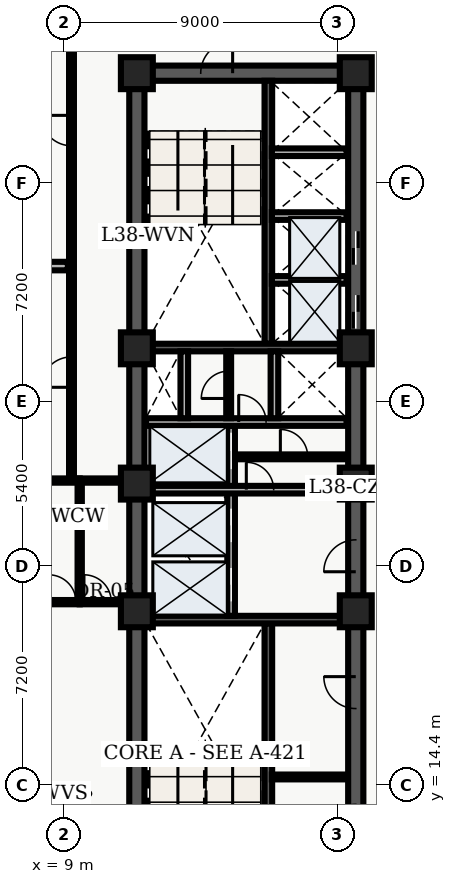
"""IFC4 building model, lengths in metres.
Left out: names, types, materials, properties, quantities, classifications, styles, units other than length and angle.
Written with IfcOpenShell. Run it as: python <this file> out.ifc"""

import sys

from ifc_helpers import new_model, entity, si_unit, converted_unit, direction, frame, origin_with_axes, origin_2d_with_axis, place, context, subcontext, project, spatial, polyline, rectangle, outline, extrude, element, fill, save


model = new_model("IFC4")
c1 = context("Model", 3, precision=1e-05, world=origin_with_axes(), true_north=direction((0.0, 1.0)))
c2 = subcontext(c1, "Body", "Model", "MODEL_VIEW")
j1 = project(units=[si_unit("LENGTHUNIT", "METRE"), converted_unit("PLANEANGLEUNIT", "DEGREE", entity("IfcPlaneAngleMeasure", 0.017), si_unit("PLANEANGLEUNIT", "RADIAN"), dimensions=[0, 0, 0, 0, 0, 0, 0])], contexts=[c1])
p1 = place(None, origin_with_axes())
s1 = spatial("IfcSite", under=j1, at=p1, CompositionType="ELEMENT")
p2 = place(p1, origin_with_axes())
s2 = spatial("IfcBuilding", under=s1, at=p2, CompositionType="ELEMENT")
p3 = place(p2, frame((0.0, 0.0, 156.3), z_axis=(0.0, 0.0, 1.0), x_axis=(1.0, 0.0, 0.0)))
s3 = spatial("IfcBuildingStorey", under=s2, at=p3, CompositionType="ELEMENT", Elevation=156.3)
p4 = place(p3, frame((11.4, 10.8, 0.0), z_axis=(0.0, 0.0, 1.0), x_axis=(0.0, 1.0, 0.0)))
e1 = element("IfcWall", 1, at=p4, inside=s3, PredefinedType="SHEAR", context=c2, shape_type="SweptSolid", body=[
    extrude(outline(polyline([(0.0, -0.25), (27.0, -0.25), (27.0, 0.25), (0.0, 0.25), (0.0, -0.25)])), origin_with_axes(), (0.0, 0.0, 1.0), 3.66),
])
p5 = place(p3, frame((11.4, 37.8, 0.0), z_axis=(0.0, 0.0, 1.0), x_axis=(1.0, 0.0, 0.0)))
e2 = element("IfcWall", 2, at=p5, inside=s3, PredefinedType="SHEAR", context=c2, shape_type="SweptSolid", body=[
    extrude(outline(polyline([(0.0, -0.25), (7.2, -0.25), (7.2, 0.25), (0.0, 0.25), (0.0, -0.25)])), origin_with_axes(), (0.0, 0.0, 1.0), 3.66),
])
p6 = place(p5, frame((2.625, 0.0, 0.0), z_axis=(0.0, 0.0, 1.0), x_axis=(1.0, 0.0, 0.0)))
e3 = element("IfcOpeningElement", 3, at=p6, cuts=e2, PredefinedType="OPENING", context=c2, shape_type="SweptSolid", body=[
    extrude(rectangle(XDim=1.05, YDim=0.52, at=origin_2d_with_axis()), origin_with_axes(), (0.0, 0.0, 1.0), 2.15),
])
p7 = place(p3, frame((18.6, 10.8, 0.0), z_axis=(0.0, 0.0, 1.0), x_axis=(0.0, 1.0, 0.0)))
e4 = element("IfcWall", 4, at=p7, inside=s3, PredefinedType="SHEAR", context=c2, shape_type="SweptSolid", body=[
    extrude(outline(polyline([(0.0, -0.25), (13.5, -0.25), (13.5, 0.25), (0.0, 0.25), (0.0, -0.25)])), origin_with_axes(), (0.0, 0.0, 1.0), 3.66),
])
p8 = place(p7, frame((11.125, 0.0, 0.0), z_axis=(0.0, 0.0, 1.0), x_axis=(1.0, 0.0, 0.0)))
e5 = element("IfcOpeningElement", 5, at=p8, cuts=e4, PredefinedType="OPENING", context=c2, shape_type="SweptSolid", body=[
    extrude(rectangle(XDim=1.05, YDim=0.52, at=origin_2d_with_axis()), origin_with_axes(), (0.0, 0.0, 1.0), 2.15),
])
p9 = place(p7, frame((2.425, 0.0, 0.0), z_axis=(0.0, 0.0, 1.0), x_axis=(1.0, 0.0, 0.0)))
e6 = element("IfcOpeningElement", 6, at=p9, cuts=e4, PredefinedType="OPENING", context=c2, shape_type="SweptSolid", body=[
    extrude(rectangle(XDim=1.05, YDim=0.52, at=origin_2d_with_axis()), origin_with_axes(), (0.0, 0.0, 1.0), 2.15),
])
p10 = place(p7, frame((6.625, 0.0, 0.0), z_axis=(0.0, 0.0, 1.0), x_axis=(1.0, 0.0, 0.0)))
e7 = element("IfcOpeningElement", 7, at=p10, cuts=e4, PredefinedType="OPENING", context=c2, shape_type="SweptSolid", body=[
    extrude(rectangle(XDim=1.05, YDim=0.52, at=origin_2d_with_axis()), origin_with_axes(), (0.0, 0.0, 1.0), 2.15),
])
p11 = place(p3, frame((18.6, 24.3, 0.0), z_axis=(0.0, 0.0, 1.0), x_axis=(0.0, 1.0, 0.0)))
e8 = element("IfcWall", 8, at=p11, inside=s3, PredefinedType="SHEAR", context=c2, shape_type="SweptSolid", body=[
    extrude(outline(polyline([(0.0, -0.25), (13.5, -0.25), (13.5, 0.25), (0.0, 0.25), (0.0, -0.25)])), origin_with_axes(), (0.0, 0.0, 1.0), 3.66),
])
p12 = place(p11, frame((5.65, 0.0, 0.0), z_axis=(0.0, 0.0, 1.0), x_axis=(1.0, 0.0, 0.0)))
e9 = element("IfcOpeningElement", 9, at=p12, cuts=e8, PredefinedType="OPENING", context=c2, shape_type="SweptSolid", body=[
    extrude(rectangle(XDim=1.1, YDim=0.52, at=origin_2d_with_axis()), origin_with_axes(), (0.0, 0.0, 1.0), 2.15),
])
p13 = place(p11, frame((7.75, 0.0, 0.0), z_axis=(0.0, 0.0, 1.0), x_axis=(1.0, 0.0, 0.0)))
e10 = element("IfcOpeningElement", 10, at=p13, cuts=e8, PredefinedType="OPENING", context=c2, shape_type="SweptSolid", body=[
    extrude(rectangle(XDim=1.1, YDim=0.52, at=origin_2d_with_axis()), origin_with_axes(), (0.0, 0.0, 1.0), 2.15),
])
p14 = place(p3, frame((15.725, 11.05, 0.0), z_axis=(0.0, 0.0, 1.0), x_axis=(0.0, 1.0, 0.0)))
e11 = element("IfcWall", 11, at=p14, inside=s3, PredefinedType="SHEAR", context=c2, shape_type="SweptSolid", body=[
    extrude(outline(polyline([(0.0, -0.125), (8.65, -0.125), (8.65, 0.125), (0.0, 0.125), (0.0, -0.125)])), origin_with_axes(), (0.0, 0.0, 1.0), 3.66),
])
p15 = place(p3, frame((11.65, 19.825, 0.0), z_axis=(0.0, 0.0, 1.0), x_axis=(1.0, 0.0, 0.0)))
e12 = element("IfcWall", 12, at=p15, inside=s3, PredefinedType="SHEAR", context=c2, shape_type="SweptSolid", body=[
    extrude(outline(polyline([(0.0, -0.125), (6.7, -0.125), (6.7, 0.125), (0.0, 0.125), (0.0, -0.125)])), origin_with_axes(), (0.0, 0.0, 1.0), 3.66),
])
p16 = place(p3, frame((15.725, 28.9, 0.0), z_axis=(0.0, 0.0, 1.0), x_axis=(0.0, 1.0, 0.0)))
e13 = element("IfcWall", 13, at=p16, inside=s3, PredefinedType="SHEAR", context=c2, shape_type="SweptSolid", body=[
    extrude(outline(polyline([(0.0, -0.125), (8.65, -0.125), (8.65, 0.125), (0.0, 0.125), (0.0, -0.125)])), origin_with_axes(), (0.0, 0.0, 1.0), 3.66),
])
p17 = place(p3, frame((11.65, 28.775, 0.0), z_axis=(0.0, 0.0, 1.0), x_axis=(1.0, 0.0, 0.0)))
e14 = element("IfcWall", 14, at=p17, inside=s3, PredefinedType="SHEAR", context=c2, shape_type="SweptSolid", body=[
    extrude(outline(polyline([(0.0, -0.125), (6.7, -0.125), (6.7, 0.125), (0.0, 0.125), (0.0, -0.125)])), origin_with_axes(), (0.0, 0.0, 1.0), 3.66),
])
p18 = place(p3, frame((14.5, 19.95, 0.0), z_axis=(0.0, 0.0, 1.0), x_axis=(0.0, 1.0, 0.0)))
e15 = element("IfcWall", 15, at=p18, inside=s3, PredefinedType="SOLIDWALL", context=c2, shape_type="SweptSolid", body=[
    extrude(outline(polyline([(0.0, -0.125), (6.25, -0.125), (6.25, 0.125), (0.0, 0.125), (0.0, -0.125)])), origin_with_axes(), (0.0, 0.0, 1.0), 2.7),
])
p19 = place(p18, frame((1.025, 0.0, 0.0), z_axis=(0.0, 0.0, 1.0), x_axis=(1.0, 0.0, 0.0)))
e16 = element("IfcOpeningElement", 16, at=p19, cuts=e15, PredefinedType="OPENING", context=c2, shape_type="SweptSolid", body=[
    extrude(rectangle(XDim=1.1, YDim=0.27, at=origin_2d_with_axis()), origin_with_axes(), (0.0, 0.0, 1.0), 2.15),
])
p20 = place(p18, frame((2.975, 0.0, 0.0), z_axis=(0.0, 0.0, 1.0), x_axis=(1.0, 0.0, 0.0)))
e17 = element("IfcOpeningElement", 17, at=p20, cuts=e15, PredefinedType="OPENING", context=c2, shape_type="SweptSolid", body=[
    extrude(rectangle(XDim=1.1, YDim=0.27, at=origin_2d_with_axis()), origin_with_axes(), (0.0, 0.0, 1.0), 2.15),
])
p21 = place(p18, frame((5.425, 0.0, 0.0), z_axis=(0.0, 0.0, 1.0), x_axis=(1.0, 0.0, 0.0)))
e18 = element("IfcOpeningElement", 18, at=p21, cuts=e15, PredefinedType="OPENING", context=c2, shape_type="SweptSolid", body=[
    extrude(rectangle(XDim=1.2, YDim=0.27, at=origin_2d_with_axis()), origin_with_axes(), (0.0, 0.0, 1.0), 2.15),
])
p22 = place(p3, frame((11.7, 24.1, 0.0), z_axis=(0.0, 0.0, 1.0), x_axis=(1.0, 0.0, 0.0)))
e19 = element("IfcWall", 19, at=p22, inside=s3, PredefinedType="SOLIDWALL", context=c2, shape_type="SweptSolid", body=[
    extrude(outline(polyline([(0.0, -0.125), (6.6, -0.125), (6.6, 0.125), (0.0, 0.125), (0.0, -0.125)])), origin_with_axes(), (0.0, 0.0, 1.0), 2.7),
])
p23 = place(p22, frame((3.75, 0.0, 0.0), z_axis=(0.0, 0.0, 1.0), x_axis=(1.0, 0.0, 0.0)))
e20 = element("IfcOpeningElement", 20, at=p23, cuts=e19, PredefinedType="OPENING", context=c2, shape_type="SweptSolid", body=[
    extrude(rectangle(XDim=0.9, YDim=0.27, at=origin_2d_with_axis()), origin_with_axes(), (0.0, 0.0, 1.0), 2.15),
])
p24 = place(p3, frame((11.7, 26.325, 0.0), z_axis=(0.0, 0.0, 1.0), x_axis=(1.0, 0.0, 0.0)))
e21 = element("IfcWall", 21, at=p24, inside=s3, PredefinedType="SOLIDWALL", context=c2, shape_type="SweptSolid", body=[
    extrude(outline(polyline([(0.0, -0.125), (6.6, -0.125), (6.6, 0.125), (0.0, 0.125), (0.0, -0.125)])), origin_with_axes(), (0.0, 0.0, 1.0), 2.7),
])
p25 = place(p24, frame((3.5, 0.0, 0.0), z_axis=(0.0, 0.0, 1.0), x_axis=(1.0, 0.0, 0.0)))
e22 = element("IfcOpeningElement", 22, at=p25, cuts=e21, PredefinedType="OPENING", context=c2, shape_type="SweptSolid", body=[
    extrude(rectangle(XDim=0.9, YDim=0.27, at=origin_2d_with_axis()), origin_with_axes(), (0.0, 0.0, 1.0), 2.15),
])
for number, where, z_axis, x_axis in (
    (23, (12.96, 26.45, 0.0), (0.0, 0.0, 1.0), (0.0, 1.0, 0.0)),
    (24, (15.925, 26.45, 0.0), (0.0, 0.0, 1.0), (0.0, 1.0, 0.0)),
):
    element("IfcWall", number, at=place(p3, frame(where, z_axis=z_axis, x_axis=x_axis)), inside=s3, PredefinedType="SOLIDWALL", context=c2, shape_type="SweptSolid", body=[
        extrude(outline(polyline([(0.0, -0.125), (2.2, -0.125), (2.2, 0.125), (0.0, 0.125), (0.0, -0.125)])), origin_with_axes(), (0.0, 0.0, 1.0), 2.7),
    ])
for number, where, z_axis, x_axis in (
    (25, (11.4, 20.1, 0.0), (0.0, 0.0, 1.0), (1.0, 0.0, 0.0)),
    (26, (11.4, 24.3, 0.0), (0.0, 0.0, 1.0), (1.0, 0.0, 0.0)),
    (27, (11.4, 28.75, 0.0), (0.0, 0.0, 1.0), (1.0, 0.0, 0.0)),
    (28, (11.4, 37.8, 0.0), (0.0, 0.0, 1.0), (1.0, 0.0, 0.0)),
    (29, (18.6, 20.1, 0.0), (0.0, 0.0, 1.0), (1.0, 0.0, 0.0)),
    (30, (18.6, 24.3, 0.0), (0.0, 0.0, 1.0), (1.0, 0.0, 0.0)),
    (31, (18.6, 28.75, 0.0), (0.0, 0.0, 1.0), (1.0, 0.0, 0.0)),
    (32, (18.6, 37.8, 0.0), (0.0, 0.0, 1.0), (1.0, 0.0, 0.0)),
):
    element("IfcColumn", number, at=place(p3, frame(where, z_axis=z_axis, x_axis=x_axis)), inside=s3, PredefinedType="COLUMN", context=c2, shape_type="SweptSolid", body=[
        extrude(rectangle(XDim=1.05, YDim=1.05, at=origin_2d_with_axis()), origin_with_axes(), (0.0, 0.0, 1.0), 3.9),
    ])
p26 = place(p3, frame((14.62, 25.18, 0.0), z_axis=(0.0, 0.0, 1.0), x_axis=(1.0, 0.0, 0.0)))
e33 = element("IfcWall", 33, at=p26, inside=s3, PredefinedType="PARTITIONING", context=c2, shape_type="SweptSolid", body=[
    extrude(outline(polyline([(0.0, -0.08), (3.68, -0.08), (3.68, 0.08), (0.0, 0.08), (0.0, -0.08)])), origin_with_axes(), (0.0, 0.0, 1.0), 2.7),
])
p27 = place(p26, frame((1.95, 0.0, 0.0), z_axis=(0.0, 0.0, 1.0), x_axis=(1.0, 0.0, 0.0)))
e34 = element("IfcOpeningElement", 34, at=p27, cuts=e33, PredefinedType="OPENING", context=c2, shape_type="SweptSolid", body=[
    extrude(rectangle(XDim=0.9, YDim=0.18, at=origin_2d_with_axis()), origin_with_axes(), (0.0, 0.0, 1.0), 2.15),
])
p28 = place(p3, frame((14.42, 26.45, 0.0), z_axis=(0.0, 0.0, 1.0), x_axis=(0.0, 1.0, 0.0)))
e35 = element("IfcWall", 35, at=p28, inside=s3, PredefinedType="PARTITIONING", context=c2, shape_type="SweptSolid", body=[
    extrude(outline(polyline([(0.0, -0.08), (2.2, -0.08), (2.2, 0.08), (0.0, 0.08), (0.0, -0.08)])), origin_with_axes(), (0.0, 0.0, 1.0), 2.7),
])
p29 = place(p28, frame((1.1, 0.0, 0.0), z_axis=(0.0, 0.0, 1.0), x_axis=(1.0, 0.0, 0.0)))
e36 = element("IfcOpeningElement", 36, at=p29, cuts=e35, PredefinedType="OPENING", context=c2, shape_type="SweptSolid", body=[
    extrude(rectangle(XDim=0.9, YDim=0.18, at=origin_2d_with_axis()), origin_with_axes(), (0.0, 0.0, 1.0), 2.15),
])
p30 = place(p3, frame((15.84, 14.65, 0.0), z_axis=(0.0, 0.0, 1.0), x_axis=(1.0, 0.0, 0.0)))
e37 = element("IfcWall", 37, at=p30, inside=s3, PredefinedType="PARTITIONING", context=c2, shape_type="SweptSolid", body=[
    extrude(outline(polyline([(0.0, -0.08), (2.46, -0.08), (2.46, 0.08), (0.0, 0.08), (0.0, -0.08)])), origin_with_axes(), (0.0, 0.0, 1.0), 2.7),
])
for number, where, z_axis, x_axis in (
    (38, (15.84, 31.0, 0.0), (0.0, 0.0, 1.0), (1.0, 0.0, 0.0)),
    (39, (15.84, 33.1, 0.0), (0.0, 0.0, 1.0), (1.0, 0.0, 0.0)),
    (40, (15.84, 35.2, 0.0), (0.0, 0.0, 1.0), (1.0, 0.0, 0.0)),
):
    element("IfcWall", number, at=place(p3, frame(where, z_axis=z_axis, x_axis=x_axis)), inside=s3, PredefinedType="SOLIDWALL", context=c2, shape_type="SweptSolid", body=[
        extrude(outline(polyline([(0.0, -0.125), (2.46, -0.125), (2.46, 0.125), (0.0, 0.125), (0.0, -0.125)])), origin_with_axes(), (0.0, 0.0, 1.0), 2.7),
    ])
p31 = place(p3, frame((9.52, 20.4, 0.0), z_axis=(0.0, 0.0, 1.0), x_axis=(0.0, 1.0, 0.0)))
e41 = element("IfcWall", 41, at=p31, inside=s3, PredefinedType="PARTITIONING", context=c2, shape_type="SweptSolid", body=[
    extrude(outline(polyline([(0.0, -0.07), (4.0, -0.07), (4.0, 0.07), (0.0, 0.07), (0.0, -0.07)])), origin_with_axes(), (0.0, 0.0, 1.0), 2.7),
])
p32 = place(p3, frame((9.52, 20.4, 0.0), z_axis=(0.0, 0.0, 1.0), x_axis=(1.0, 0.0, 0.0)))
e42 = element("IfcWall", 42, at=p32, inside=s3, PredefinedType="PARTITIONING", context=c2, shape_type="SweptSolid", body=[
    extrude(outline(polyline([(0.0, -0.07), (1.58, -0.07), (1.58, 0.07), (0.0, 0.07), (0.0, -0.07)])), origin_with_axes(), (0.0, 0.0, 1.0), 2.7),
])
p33 = place(p32, frame((0.59, 0.0, 0.0), z_axis=(0.0, 0.0, 1.0), x_axis=(1.0, 0.0, 0.0)))
e43 = element("IfcOpeningElement", 43, at=p33, cuts=e42, PredefinedType="OPENING", context=c2, shape_type="SweptSolid", body=[
    extrude(rectangle(XDim=0.9, YDim=0.16, at=origin_2d_with_axis()), origin_with_axes(), (0.0, 0.0, 1.0), 2.15),
])
p34 = place(p3, frame((9.52, 24.4, 0.0), z_axis=(0.0, 0.0, 1.0), x_axis=(1.0, 0.0, 0.0)))
e44 = element("IfcWall", 44, at=p34, inside=s3, PredefinedType="PARTITIONING", context=c2, shape_type="SweptSolid", body=[
    extrude(outline(polyline([(0.0, -0.07), (1.58, -0.07), (1.58, 0.07), (0.0, 0.07), (0.0, -0.07)])), origin_with_axes(), (0.0, 0.0, 1.0), 2.7),
])
p35 = place(p3, frame((9.25, 24.4, 0.0), z_axis=(0.0, 0.0, 1.0), x_axis=(0.0, 1.0, 0.0)))
e45 = element("IfcWall", 45, at=p35, inside=s3, PredefinedType="PARTITIONING", context=c2, shape_type="SweptSolid", body=[
    extrude(outline(polyline([(0.0, -0.08), (16.1, -0.08), (16.1, 0.08), (0.0, 0.08), (0.0, -0.08)])), origin_with_axes(), (0.0, 0.0, 1.0), 2.7),
])
p36 = place(p35, frame((3.567, 0.0, 0.0), z_axis=(0.0, 0.0, 1.0), x_axis=(1.0, 0.0, 0.0)))
e46 = element("IfcOpeningElement", 46, at=p36, cuts=e45, PredefinedType="OPENING", context=c2, shape_type="SweptSolid", body=[
    extrude(rectangle(XDim=1.0, YDim=0.18, at=origin_2d_with_axis()), origin_with_axes(), (0.0, 0.0, 1.0), 2.15),
])
p37 = place(p35, frame((11.512, 0.0, 0.0), z_axis=(0.0, 0.0, 1.0), x_axis=(1.0, 0.0, 0.0)))
e47 = element("IfcOpeningElement", 47, at=p37, cuts=e45, PredefinedType="OPENING", context=c2, shape_type="SweptSolid", body=[
    extrude(rectangle(XDim=1.0, YDim=0.18, at=origin_2d_with_axis()), origin_with_axes(), (0.0, 0.0, 1.0), 2.15),
])
p38 = place(p3, frame((0.335, 20.4, 0.0), z_axis=(0.0, 0.0, 1.0), x_axis=(1.0, 0.0, 0.0)))
e48 = element("IfcWall", 48, at=p38, inside=s3, PredefinedType="PARTITIONING", context=c2, shape_type="SweptSolid", body=[
    extrude(outline(polyline([(0.0, -0.07), (9.185, -0.07), (9.185, 0.07), (0.0, 0.07), (0.0, -0.07)])), origin_with_axes(), (0.0, 0.0, 1.0), 2.7),
])
p39 = place(p38, frame((8.615, 0.0, 0.0), z_axis=(0.0, 0.0, 1.0), x_axis=(1.0, 0.0, 0.0)))
e49 = element("IfcOpeningElement", 49, at=p39, cuts=e48, PredefinedType="OPENING", context=c2, shape_type="SweptSolid", body=[
    extrude(rectangle(XDim=0.9, YDim=0.16, at=origin_2d_with_axis()), origin_with_axes(), (0.0, 0.0, 1.0), 2.15),
])
p40 = place(p3, frame((0.335, 24.4, 0.0), z_axis=(0.0, 0.0, 1.0), x_axis=(1.0, 0.0, 0.0)))
e50 = element("IfcWall", 50, at=p40, inside=s3, PredefinedType="PARTITIONING", context=c2, shape_type="SweptSolid", body=[
    extrude(outline(polyline([(0.0, -0.07), (9.185, -0.07), (9.185, 0.07), (0.0, 0.07), (0.0, -0.07)])), origin_with_axes(), (0.0, 0.0, 1.0), 2.7),
])
p41 = place(p3, frame((0.335, 31.455, 0.0), z_axis=(0.0, 0.0, 1.0), x_axis=(1.0, 0.0, 0.0)))
e51 = element("IfcWall", 51, at=p41, inside=s3, PredefinedType="PARTITIONING", context=c2, shape_type="SweptSolid", body=[
    extrude(outline(polyline([(0.0, -0.14), (8.795, -0.14), (8.795, 0.14), (0.0, 0.14), (0.0, -0.14)])), origin_with_axes(), (0.0, 0.0, 1.0), 2.7),
])
p42 = place(p11, frame((5.65, 0.0, 0.0), z_axis=(0.0, 0.0, 1.0), x_axis=(1.0, 0.0, 0.0)))
e52 = element("IfcDoor", 52, at=p42, inside=s3, OperationType="SLIDING_TO_LEFT", PredefinedType="DOOR", context=c2, shape_type="SweptSolid", body=[
    extrude(rectangle(XDim=1.1, YDim=0.09, at=origin_2d_with_axis()), origin_with_axes(), (0.0, 0.0, 1.0), 2.15),
])
fill(e9, e52)
p43 = place(p11, frame((7.75, 0.0, 0.0), z_axis=(0.0, 0.0, 1.0), x_axis=(1.0, 0.0, 0.0)))
e53 = element("IfcDoor", 53, at=p43, inside=s3, OperationType="SLIDING_TO_RIGHT", PredefinedType="DOOR", context=c2, shape_type="SweptSolid", body=[
    extrude(rectangle(XDim=1.1, YDim=0.09, at=origin_2d_with_axis()), origin_with_axes(), (0.0, 0.0, 1.0), 2.15),
])
fill(e10, e53)
p44 = place(p18, frame((1.025, 0.0, 0.0), z_axis=(0.0, 0.0, 1.0), x_axis=(1.0, 0.0, 0.0)))
e54 = element("IfcDoor", 54, at=p44, inside=s3, OperationType="SLIDING_TO_LEFT", PredefinedType="DOOR", context=c2, shape_type="SweptSolid", body=[
    extrude(rectangle(XDim=1.1, YDim=0.09, at=origin_2d_with_axis()), origin_with_axes(), (0.0, 0.0, 1.0), 2.15),
])
fill(e16, e54)
p45 = place(p18, frame((2.975, 0.0, 0.0), z_axis=(0.0, 0.0, 1.0), x_axis=(1.0, 0.0, 0.0)))
e55 = element("IfcDoor", 55, at=p45, inside=s3, OperationType="SLIDING_TO_RIGHT", PredefinedType="DOOR", context=c2, shape_type="SweptSolid", body=[
    extrude(rectangle(XDim=1.1, YDim=0.09, at=origin_2d_with_axis()), origin_with_axes(), (0.0, 0.0, 1.0), 2.15),
])
fill(e17, e55)
p46 = place(p18, frame((5.425, 0.0, 0.0), z_axis=(0.0, 0.0, 1.0), x_axis=(1.0, 0.0, 0.0)))
e56 = element("IfcDoor", 56, at=p46, inside=s3, OperationType="DOUBLE_DOOR_SLIDING", PredefinedType="DOOR", context=c2, shape_type="SweptSolid", body=[
    extrude(rectangle(XDim=1.2, YDim=0.09, at=origin_2d_with_axis()), origin_with_axes(), (0.0, 0.0, 1.0), 2.15),
])
fill(e18, e56)
p47 = place(p5, frame((2.625, 0.0, 0.0), z_axis=(0.0, 0.0, 1.0), x_axis=(1.0, 0.0, 0.0)))
e57 = element("IfcDoor", 57, at=p47, inside=s3, OperationType="SINGLE_SWING_RIGHT", PredefinedType="DOOR", context=c2, shape_type="SweptSolid", body=[
    extrude(rectangle(XDim=1.05, YDim=0.09, at=origin_2d_with_axis()), origin_with_axes(), (0.0, 0.0, 1.0), 2.15),
])
fill(e3, e57)
p48 = place(p7, frame((11.125, 0.0, 0.0), z_axis=(0.0, 0.0, 1.0), x_axis=(1.0, 0.0, 0.0)))
e58 = element("IfcDoor", 58, at=p48, inside=s3, OperationType="SINGLE_SWING_LEFT", PredefinedType="DOOR", context=c2, shape_type="SweptSolid", body=[
    extrude(rectangle(XDim=1.05, YDim=0.09, at=origin_2d_with_axis()), origin_with_axes(), (0.0, 0.0, 1.0), 2.15),
])
fill(e5, e58)
p49 = place(p24, frame((3.5, 0.0, 0.0), z_axis=(0.0, 0.0, 1.0), x_axis=(1.0, 0.0, 0.0)))
e59 = element("IfcDoor", 59, at=p49, inside=s3, OperationType="SINGLE_SWING_LEFT", PredefinedType="DOOR", context=c2, shape_type="SweptSolid", body=[
    extrude(rectangle(XDim=0.9, YDim=0.09, at=origin_2d_with_axis()), origin_with_axes(), (0.0, 0.0, 1.0), 2.15),
])
fill(e22, e59)
p50 = place(p28, frame((1.1, 0.0, 0.0), z_axis=(0.0, 0.0, 1.0), x_axis=(1.0, 0.0, 0.0)))
e60 = element("IfcDoor", 60, at=p50, inside=s3, OperationType="SINGLE_SWING_LEFT", PredefinedType="DOOR", context=c2, shape_type="SweptSolid", body=[
    extrude(rectangle(XDim=0.9, YDim=0.09, at=origin_2d_with_axis()), origin_with_axes(), (0.0, 0.0, 1.0), 2.15),
])
fill(e36, e60)
p51 = place(p22, frame((3.75, 0.0, 0.0), z_axis=(0.0, 0.0, 1.0), x_axis=(1.0, 0.0, 0.0)))
e61 = element("IfcDoor", 61, at=p51, inside=s3, OperationType="SINGLE_SWING_LEFT", PredefinedType="DOOR", context=c2, shape_type="SweptSolid", body=[
    extrude(rectangle(XDim=0.9, YDim=0.09, at=origin_2d_with_axis()), origin_with_axes(), (0.0, 0.0, 1.0), 2.15),
])
fill(e20, e61)
p52 = place(p26, frame((1.95, 0.0, 0.0), z_axis=(0.0, 0.0, 1.0), x_axis=(1.0, 0.0, 0.0)))
e62 = element("IfcDoor", 62, at=p52, inside=s3, OperationType="SINGLE_SWING_LEFT", PredefinedType="DOOR", context=c2, shape_type="SweptSolid", body=[
    extrude(rectangle(XDim=0.9, YDim=0.09, at=origin_2d_with_axis()), origin_with_axes(), (0.0, 0.0, 1.0), 2.15),
])
fill(e34, e62)
p53 = place(p7, frame((2.425, 0.0, 0.0), z_axis=(0.0, 0.0, 1.0), x_axis=(1.0, 0.0, 0.0)))
e63 = element("IfcDoor", 63, at=p53, inside=s3, OperationType="SINGLE_SWING_LEFT", PredefinedType="DOOR", context=c2, shape_type="SweptSolid", body=[
    extrude(rectangle(XDim=1.05, YDim=0.09, at=origin_2d_with_axis()), origin_with_axes(), (0.0, 0.0, 1.0), 2.15),
])
fill(e6, e63)
p54 = place(p7, frame((6.625, 0.0, 0.0), z_axis=(0.0, 0.0, 1.0), x_axis=(1.0, 0.0, 0.0)))
e64 = element("IfcDoor", 64, at=p54, inside=s3, OperationType="SINGLE_SWING_RIGHT", PredefinedType="DOOR", context=c2, shape_type="SweptSolid", body=[
    extrude(rectangle(XDim=1.05, YDim=0.09, at=origin_2d_with_axis()), origin_with_axes(), (0.0, 0.0, 1.0), 2.15),
])
fill(e7, e64)
p55 = place(p32, frame((0.59, 0.0, 0.0), z_axis=(0.0, 0.0, 1.0), x_axis=(1.0, 0.0, 0.0)))
e65 = element("IfcDoor", 65, at=p55, inside=s3, OperationType="SINGLE_SWING_LEFT", PredefinedType="DOOR", context=c2, shape_type="SweptSolid", body=[
    extrude(rectangle(XDim=0.9, YDim=0.084, at=origin_2d_with_axis()), origin_with_axes(), (0.0, 0.0, 1.0), 2.15),
])
fill(e43, e65)
p56 = place(p38, frame((8.615, 0.0, 0.0), z_axis=(0.0, 0.0, 1.0), x_axis=(1.0, 0.0, 0.0)))
e66 = element("IfcDoor", 66, at=p56, inside=s3, OperationType="SINGLE_SWING_LEFT", PredefinedType="DOOR", context=c2, shape_type="SweptSolid", body=[
    extrude(rectangle(XDim=0.9, YDim=0.084, at=origin_2d_with_axis()), origin_with_axes(), (0.0, 0.0, 1.0), 2.15),
])
fill(e49, e66)
p57 = place(p35, frame((3.567, 0.0, 0.0), z_axis=(0.0, 0.0, 1.0), x_axis=(1.0, 0.0, 0.0)))
e67 = element("IfcDoor", 67, at=p57, inside=s3, OperationType="SINGLE_SWING_LEFT", PredefinedType="DOOR", context=c2, shape_type="SweptSolid", body=[
    extrude(rectangle(XDim=1.0, YDim=0.09, at=origin_2d_with_axis()), origin_with_axes(), (0.0, 0.0, 1.0), 2.15),
])
fill(e46, e67)
p58 = place(p35, frame((11.512, 0.0, 0.0), z_axis=(0.0, 0.0, 1.0), x_axis=(1.0, 0.0, 0.0)))
e68 = element("IfcDoor", 68, at=p58, inside=s3, OperationType="SINGLE_SWING_RIGHT", PredefinedType="DOOR", context=c2, shape_type="SweptSolid", body=[
    extrude(rectangle(XDim=1.0, YDim=0.09, at=origin_2d_with_axis()), origin_with_axes(), (0.0, 0.0, 1.0), 2.15),
])
fill(e47, e68)
save(model, sys.argv[1])
